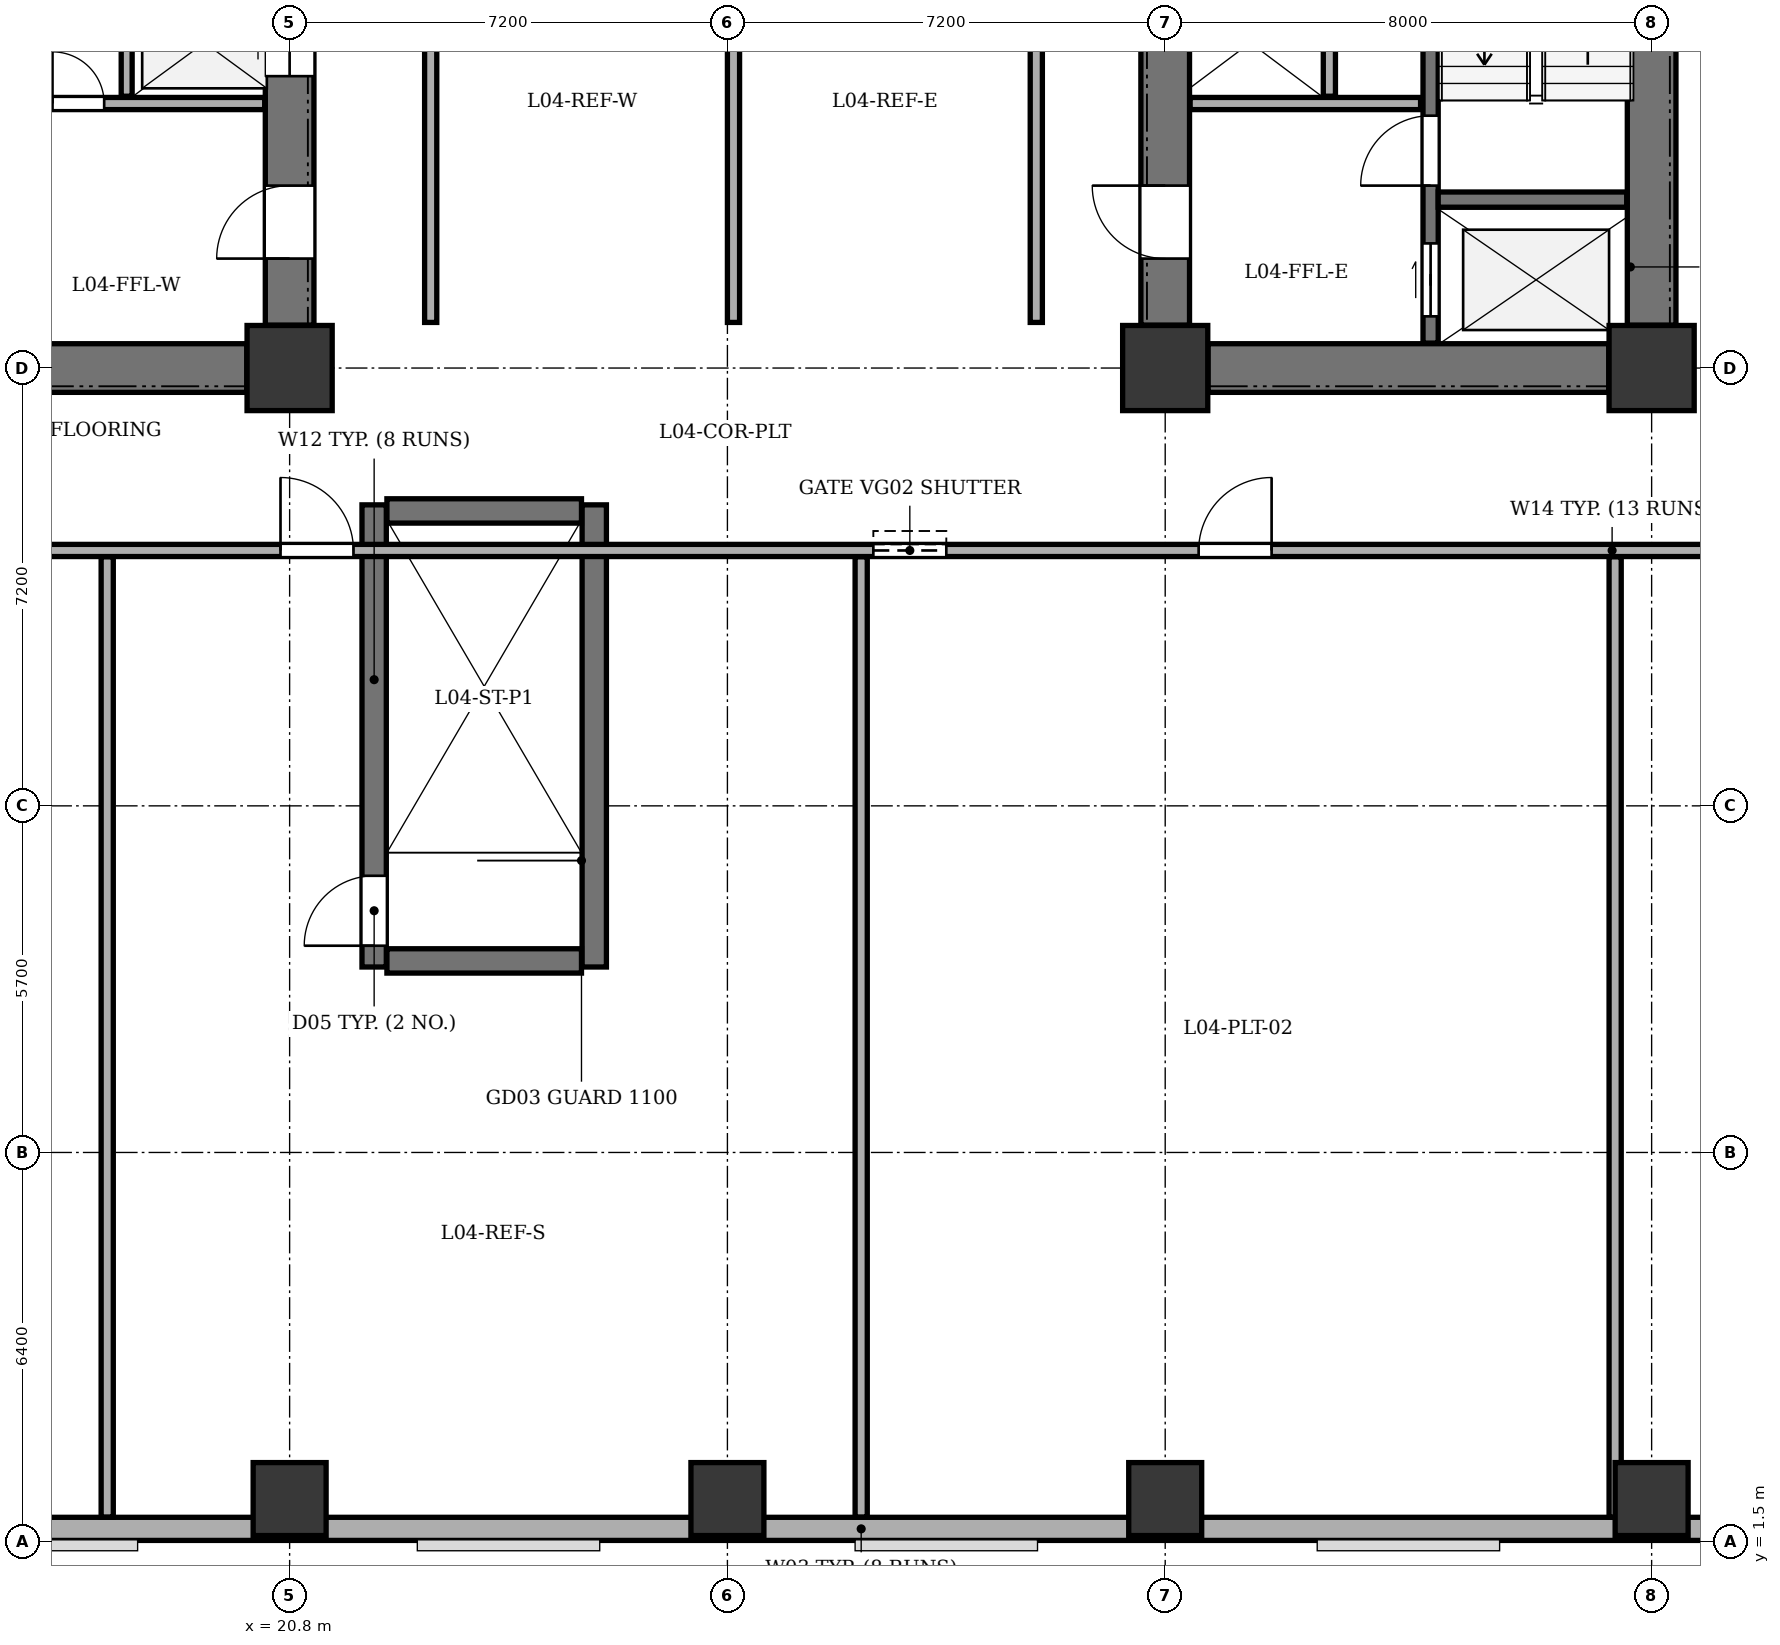
"""IFC4 building model, lengths in metres.
Left out: names, types, materials, properties, quantities, classifications, styles, units other than length and angle.
Written with IfcOpenShell. Run it as: python <this file> out.ifc"""

import sys

from ifc_helpers import new_model, si_unit, direction, frame, frame_2d, origin, origin_2d, place, context, subcontext, project, spatial, rectangle, extrude, element, fill, save


model = new_model("IFC4")
c1 = context("Model", 3, precision=1e-05, world=origin(), true_north=direction((0.0, 1.0)))
c2 = subcontext(c1, "Body", "Model", "MODEL_VIEW")
j1 = project(units=[si_unit("LENGTHUNIT", "METRE"), si_unit("PLANEANGLEUNIT", "RADIAN")], contexts=[c1])
p1 = place(None, origin())
s1 = spatial("IfcSite", under=j1, at=p1, CompositionType="ELEMENT")
p2 = place(p1, origin())
s2 = spatial("IfcBuilding", under=s1, at=p2, CompositionType="ELEMENT")
p3 = place(p2, frame((0.0, 0.0, 18.9)))
s3 = spatial("IfcBuildingStorey", under=s2, at=p3, CompositionType="ELEMENT", Elevation=18.9)
for number, where, z_axis, x_axis in (
    (1, (20.8, 20.8, 0.0), (0.0, 0.0, 1.0), (1.0, 0.0, 0.0)),
    (2, (35.2, 20.8, 0.0), (0.0, 0.0, 1.0), (1.0, 0.0, 0.0)),
    (3, (43.2, 20.8, 0.0), (0.0, 0.0, 1.0), (1.0, 0.0, 0.0)),
):
    element("IfcColumn", number, at=place(p3, frame(where, z_axis=z_axis, x_axis=x_axis)), inside=s3, PredefinedType="COLUMN", context=c2, shape_type="SweptSolid", body=[
        extrude(rectangle(XDim=1.4, YDim=1.4, at=origin_2d()), origin(), (0.0, 0.0, 1.0), 5.4),
    ])
for number, where, z_axis, x_axis in (
    (4, (20.8, 2.2, 0.0), (0.0, 0.0, 1.0), (1.0, 0.0, 0.0)),
    (5, (28.0, 2.2, 0.0), (0.0, 0.0, 1.0), (1.0, 0.0, 0.0)),
    (6, (35.2, 2.2, 0.0), (0.0, 0.0, 1.0), (1.0, 0.0, 0.0)),
    (7, (43.2, 2.2, 0.0), (0.0, 0.0, 1.0), (1.0, 0.0, 0.0)),
):
    element("IfcColumn", number, at=place(p3, frame(where, z_axis=z_axis, x_axis=x_axis)), inside=s3, PredefinedType="COLUMN", context=c2, shape_type="SweptSolid", body=[
        extrude(rectangle(XDim=1.2, YDim=1.2, at=origin_2d()), origin(), (0.0, 0.0, 1.0), 5.4),
    ])
p4 = place(p3, frame((55.0, 1.71, 0.0), z_axis=(0.0, 0.0, 1.0), x_axis=(-1.0, 0.0, 0.0)))
e8 = element("IfcWall", 8, at=p4, inside=s3, PredefinedType="STANDARD", context=c2, shape_type="SweptSolid", body=[
    extrude(rectangle(XDim=49.6, YDim=0.38, at=frame_2d((24.8, 0.0))), origin(), (0.0, 0.0, 1.0), 4.95),
])
p5 = place(p3, frame((13.505, 20.8, 0.0), z_axis=(0.0, 0.0, 1.0), x_axis=(1.0, 0.0, 0.0)))
e9 = element("IfcWall", 9, at=p5, inside=s3, PredefinedType="SHEAR", context=c2, shape_type="SweptSolid", body=[
    extrude(rectangle(XDim=6.59, YDim=0.8, at=frame_2d((3.295, 0.0))), origin(), (0.0, 0.0, 1.0), 4.95),
])
p6 = place(p3, frame((20.8, 21.505, 0.0), z_axis=(0.0, 0.0, 1.0), x_axis=(0.0, 1.0, 0.0)))
e10 = element("IfcWall", 10, at=p6, inside=s3, PredefinedType="SHEAR", context=c2, shape_type="SweptSolid", body=[
    extrude(rectangle(XDim=11.39, YDim=0.8, at=frame_2d((5.695, 0.0))), origin(), (0.0, 0.0, 1.0), 4.95),
])
p7 = place(p6, frame((1.095, 0.0, 0.0)))
e11 = element("IfcOpeningElement", 11, at=p7, cuts=e10, PredefinedType="OPENING", context=c2, shape_type="SweptSolid", body=[
    extrude(rectangle(XDim=1.2, YDim=2.15, at=frame_2d((0.6, 1.075))), frame((0.0, 0.41, 0.0), z_axis=(0.0, -1.0, 0.0), x_axis=(1.0, 0.0, 0.0)), (0.0, 0.0, 1.0), 0.82),
])
p8 = place(p6, frame((4.095, 0.0, 0.0)))
e12 = element("IfcOpeningElement", 12, at=p8, cuts=e10, PredefinedType="OPENING", context=c2, shape_type="SweptSolid", body=[
    extrude(rectangle(XDim=1.1, YDim=2.1, at=frame_2d((0.55, 1.05))), frame((0.0, 0.41, 0.0), z_axis=(0.0, -1.0, 0.0), x_axis=(1.0, 0.0, 0.0)), (0.0, 0.0, 1.0), 0.82),
])
p9 = place(p6, frame((6.045, 0.0, 0.0)))
e13 = element("IfcOpeningElement", 13, at=p9, cuts=e10, PredefinedType="OPENING", context=c2, shape_type="SweptSolid", body=[
    extrude(rectangle(XDim=1.1, YDim=2.1, at=frame_2d((0.55, 1.05))), frame((0.0, 0.41, 0.0), z_axis=(0.0, -1.0, 0.0), x_axis=(1.0, 0.0, 0.0)), (0.0, 0.0, 1.0), 0.82),
])
p10 = place(p6, frame((7.995, 0.0, 0.0)))
e14 = element("IfcOpeningElement", 14, at=p10, cuts=e10, PredefinedType="OPENING", context=c2, shape_type="SweptSolid", body=[
    extrude(rectangle(XDim=1.1, YDim=2.1, at=frame_2d((0.55, 1.05))), frame((0.0, 0.41, 0.0), z_axis=(0.0, -1.0, 0.0), x_axis=(1.0, 0.0, 0.0)), (0.0, 0.0, 1.0), 0.82),
])
p11 = place(p3, frame((16.6, 25.15, 0.0), z_axis=(0.0, 0.0, 1.0), x_axis=(1.0, 0.0, 0.0)))
e15 = element("IfcWall", 15, at=p11, inside=s3, PredefinedType="SOLIDWALL", context=c2, shape_type="SweptSolid", body=[
    extrude(rectangle(XDim=3.79, YDim=0.2, at=frame_2d((1.895, 0.0))), origin(), (0.0, 0.0, 1.0), 4.95),
])
p12 = place(p11, frame((0.3, 0.0, 0.0)))
e16 = element("IfcOpeningElement", 16, at=p12, cuts=e15, PredefinedType="OPENING", context=c2, shape_type="SweptSolid", body=[
    extrude(rectangle(XDim=0.85, YDim=2.02, at=frame_2d((0.425, 1.01))), frame((0.0, 0.11, 0.0), z_axis=(0.0, -1.0, 0.0), x_axis=(1.0, 0.0, 0.0)), (0.0, 0.0, 1.0), 0.22),
])
p13 = place(p3, frame((18.12, 25.27, 0.0), z_axis=(0.0, 0.0, 1.0), x_axis=(0.0, 1.0, 0.0)))
e17 = element("IfcWall", 17, at=p13, inside=s3, PredefinedType="PARTITIONING", context=c2, shape_type="SweptSolid", body=[
    extrude(rectangle(XDim=5.66, YDim=0.18, at=frame_2d((2.83, 0.0))), origin(), (0.0, 0.0, 1.0), 4.95),
])
p14 = place(p3, frame((43.2, 21.505, 0.0), z_axis=(0.0, 0.0, 1.0), x_axis=(0.0, 1.0, 0.0)))
e18 = element("IfcWall", 18, at=p14, inside=s3, PredefinedType="SHEAR", context=c2, shape_type="SweptSolid", body=[
    extrude(rectangle(XDim=11.39, YDim=0.8, at=frame_2d((5.695, 0.0))), origin(), (0.0, 0.0, 1.0), 4.95),
])
p15 = place(p3, frame((35.905, 20.8, 0.0), z_axis=(0.0, 0.0, 1.0), x_axis=(1.0, 0.0, 0.0)))
e19 = element("IfcWall", 19, at=p15, inside=s3, PredefinedType="SHEAR", context=c2, shape_type="SweptSolid", body=[
    extrude(rectangle(XDim=6.59, YDim=0.8, at=frame_2d((3.295, 0.0))), origin(), (0.0, 0.0, 1.0), 4.95),
])
p16 = place(p3, frame((35.2, 21.505, 0.0), z_axis=(0.0, 0.0, 1.0), x_axis=(0.0, 1.0, 0.0)))
e20 = element("IfcWall", 20, at=p16, inside=s3, PredefinedType="SHEAR", context=c2, shape_type="SweptSolid", body=[
    extrude(rectangle(XDim=11.39, YDim=0.8, at=frame_2d((5.695, 0.0))), origin(), (0.0, 0.0, 1.0), 4.95),
])
p17 = place(p16, frame((1.095, 0.0, 0.0)))
e21 = element("IfcOpeningElement", 21, at=p17, cuts=e20, PredefinedType="OPENING", context=c2, shape_type="SweptSolid", body=[
    extrude(rectangle(XDim=1.2, YDim=2.15, at=frame_2d((0.6, 1.075))), frame((0.0, 0.41, 0.0), z_axis=(0.0, -1.0, 0.0), x_axis=(1.0, 0.0, 0.0)), (0.0, 0.0, 1.0), 0.82),
])
p18 = place(p3, frame((39.565, 21.21, 0.0), z_axis=(0.0, 0.0, 1.0), x_axis=(0.0, 1.0, 0.0)))
e22 = element("IfcWall", 22, at=p18, inside=s3, PredefinedType="SHEAR", context=c2, shape_type="SweptSolid", body=[
    extrude(rectangle(XDim=11.98, YDim=0.25, at=frame_2d((5.99, 0.0))), origin(), (0.0, 0.0, 1.0), 4.95),
])
p19 = place(p18, frame((0.44, 0.0, 0.0)))
e23 = element("IfcOpeningElement", 23, at=p19, cuts=e22, PredefinedType="OPENING", context=c2, shape_type="SweptSolid", body=[
    extrude(rectangle(XDim=1.2, YDim=2.15, at=frame_2d((0.6, 1.075))), frame((0.0, 0.135, 0.0), z_axis=(0.0, -1.0, 0.0), x_axis=(1.0, 0.0, 0.0)), (0.0, 0.0, 1.0), 0.27),
])
p20 = place(p18, frame((2.59, 0.0, 0.0)))
e24 = element("IfcOpeningElement", 24, at=p20, cuts=e22, PredefinedType="OPENING", context=c2, shape_type="SweptSolid", body=[
    extrude(rectangle(XDim=1.15, YDim=2.15, at=frame_2d((0.575, 1.075))), frame((0.0, 0.135, 0.0), z_axis=(0.0, -1.0, 0.0), x_axis=(1.0, 0.0, 0.0)), (0.0, 0.0, 1.0), 0.27),
])
p21 = place(p3, frame((39.69, 23.57, 0.0), z_axis=(0.0, 0.0, 1.0), x_axis=(1.0, 0.0, 0.0)))
e25 = element("IfcWall", 25, at=p21, inside=s3, PredefinedType="SHEAR", context=c2, shape_type="SweptSolid", body=[
    extrude(rectangle(XDim=3.1, YDim=0.25, at=frame_2d((1.55, 0.0))), origin(), (0.0, 0.0, 1.0), 4.95),
])
p22 = place(p3, frame((35.61, 25.15, 0.0), z_axis=(0.0, 0.0, 1.0), x_axis=(1.0, 0.0, 0.0)))
e26 = element("IfcWall", 26, at=p22, inside=s3, PredefinedType="SOLIDWALL", context=c2, shape_type="SweptSolid", body=[
    extrude(rectangle(XDim=3.79, YDim=0.2, at=frame_2d((1.895, 0.0))), origin(), (0.0, 0.0, 1.0), 4.95),
])
p23 = place(p3, frame((37.9, 25.27, 0.0), z_axis=(0.0, 0.0, 1.0), x_axis=(0.0, 1.0, 0.0)))
e27 = element("IfcWall", 27, at=p23, inside=s3, PredefinedType="SOLIDWALL", context=c2, shape_type="SweptSolid", body=[
    extrude(rectangle(XDim=7.92, YDim=0.2, at=frame_2d((3.96, 0.0))), origin(), (0.0, 0.0, 1.0), 4.95),
])
p24 = place(p3, frame((22.19, 10.95, 0.0), z_axis=(0.0, 0.0, 1.0), x_axis=(0.0, 1.0, 0.0)))
e28 = element("IfcWall", 28, at=p24, inside=s3, PredefinedType="SHEAR", context=c2, shape_type="SweptSolid", body=[
    extrude(rectangle(XDim=7.6, YDim=0.4, at=frame_2d((3.8, 0.0))), origin(), (0.0, 0.0, 1.0), 4.95),
])
p25 = place(p24, frame((0.35, 0.0, 0.0)))
e29 = element("IfcOpeningElement", 29, at=p25, cuts=e28, PredefinedType="OPENING", context=c2, shape_type="SweptSolid", body=[
    extrude(rectangle(XDim=1.15, YDim=2.15, at=frame_2d((0.575, 1.075))), frame((0.0, 0.21, 0.0), z_axis=(0.0, -1.0, 0.0), x_axis=(1.0, 0.0, 0.0)), (0.0, 0.0, 1.0), 0.42),
])
p26 = place(p3, frame((25.81, 10.95, 0.0), z_axis=(0.0, 0.0, 1.0), x_axis=(0.0, 1.0, 0.0)))
e30 = element("IfcWall", 30, at=p26, inside=s3, PredefinedType="SHEAR", context=c2, shape_type="SweptSolid", body=[
    extrude(rectangle(XDim=7.6, YDim=0.4, at=frame_2d((3.8, 0.0))), origin(), (0.0, 0.0, 1.0), 4.95),
])
for number, where, z_axis, x_axis in (
    (31, (22.4, 11.05, 0.0), (0.0, 0.0, 1.0), (1.0, 0.0, 0.0)),
    (32, (22.4, 18.45, 0.0), (0.0, 0.0, 1.0), (1.0, 0.0, 0.0)),
):
    element("IfcWall", number, at=place(p3, frame(where, z_axis=z_axis, x_axis=x_axis)), inside=s3, PredefinedType="SHEAR", context=c2, shape_type="SweptSolid", body=[
        extrude(rectangle(XDim=3.2, YDim=0.4, at=frame_2d((1.6, 0.0))), origin(), (0.0, 0.0, 1.0), 4.95),
    ])
p27 = place(p3, frame((5.4, 17.8, 0.0), z_axis=(0.0, 0.0, 1.0), x_axis=(1.0, 0.0, 0.0)))
e33 = element("IfcWall", 33, at=p27, inside=s3, PredefinedType="SOLIDWALL", context=c2, shape_type="SweptSolid", body=[
    extrude(rectangle(XDim=49.6, YDim=0.2, at=frame_2d((24.8, 0.0))), origin(), (0.0, 0.0, 1.0), 4.95),
])
p28 = place(p27, frame((5.55, 0.0, 0.0)))
e34 = element("IfcOpeningElement", 34, at=p28, cuts=e33, PredefinedType="OPENING", context=c2, shape_type="SweptSolid", body=[
    extrude(rectangle(XDim=1.2, YDim=2.15, at=frame_2d((0.6, 1.075))), frame((0.0, 0.11, 0.0), z_axis=(0.0, -1.0, 0.0), x_axis=(1.0, 0.0, 0.0)), (0.0, 0.0, 1.0), 0.22),
])
p29 = place(p27, frame((15.25, 0.0, 0.0)))
e35 = element("IfcOpeningElement", 35, at=p29, cuts=e33, PredefinedType="OPENING", context=c2, shape_type="SweptSolid", body=[
    extrude(rectangle(XDim=1.2, YDim=2.15, at=frame_2d((0.6, 1.075))), frame((0.0, 0.11, 0.0), z_axis=(0.0, -1.0, 0.0), x_axis=(1.0, 0.0, 0.0)), (0.0, 0.0, 1.0), 0.22),
])
p30 = place(p27, frame((30.35, 0.0, 0.0)))
e36 = element("IfcOpeningElement", 36, at=p30, cuts=e33, PredefinedType="OPENING", context=c2, shape_type="SweptSolid", body=[
    extrude(rectangle(XDim=1.2, YDim=2.15, at=frame_2d((0.6, 1.075))), frame((0.0, 0.11, 0.0), z_axis=(0.0, -1.0, 0.0), x_axis=(1.0, 0.0, 0.0)), (0.0, 0.0, 1.0), 0.22),
])
p31 = place(p27, frame((42.75, 0.0, 0.0)))
e37 = element("IfcOpeningElement", 37, at=p31, cuts=e33, PredefinedType="OPENING", context=c2, shape_type="SweptSolid", body=[
    extrude(rectangle(XDim=1.2, YDim=2.15, at=frame_2d((0.6, 1.075))), frame((0.0, 0.11, 0.0), z_axis=(0.0, -1.0, 0.0), x_axis=(1.0, 0.0, 0.0)), (0.0, 0.0, 1.0), 0.22),
])
p32 = place(p27, frame((25.0, 0.0, 0.0)))
e38 = element("IfcOpeningElement", 38, at=p32, cuts=e33, PredefinedType="OPENING", context=c2, shape_type="SweptSolid", body=[
    extrude(rectangle(XDim=1.2, YDim=2.15, at=frame_2d((0.6, 1.075))), frame((0.0, 0.11, 0.0), z_axis=(0.0, -1.0, 0.0), x_axis=(1.0, 0.0, 0.0)), (0.0, 0.0, 1.0), 0.22),
])
for number, where, z_axis, x_axis in (
    (39, (23.12, 21.55, 0.0), (0.0, 0.0, 1.0), (0.0, 1.0, 0.0)),
    (40, (33.08, 21.55, 0.0), (0.0, 0.0, 1.0), (0.0, 1.0, 0.0)),
):
    element("IfcWall", number, at=place(p3, frame(where, z_axis=z_axis, x_axis=x_axis)), inside=s3, PredefinedType="SOLIDWALL", context=c2, shape_type="SweptSolid", body=[
        extrude(rectangle(XDim=8.45, YDim=0.2, at=frame_2d((4.225, 0.0))), origin(), (0.0, 0.0, 1.0), 4.95),
    ])
p33 = place(p3, frame((28.1, 21.55, 0.0), z_axis=(0.0, 0.0, 1.0), x_axis=(0.0, 1.0, 0.0)))
e41 = element("IfcWall", 41, at=p33, inside=s3, PredefinedType="SOLIDWALL", context=c2, shape_type="SweptSolid", body=[
    extrude(rectangle(XDim=8.45, YDim=0.2, at=frame_2d((4.225, 0.0))), origin(), (0.0, 0.0, 1.0), 4.035),
])
p34 = place(p3, frame((17.8, 1.905, 0.0), z_axis=(0.0, 0.0, 1.0), x_axis=(0.0, 1.0, 0.0)))
e42 = element("IfcWall", 42, at=p34, inside=s3, PredefinedType="SOLIDWALL", context=c2, shape_type="SweptSolid", body=[
    extrude(rectangle(XDim=15.79, YDim=0.2, at=frame_2d((7.895, 0.0))), origin(), (0.0, 0.0, 1.0), 4.385),
])
for number, where, z_axis, x_axis in (
    (43, (30.2, 1.905, 0.0), (0.0, 0.0, 1.0), (0.0, 1.0, 0.0)),
    (44, (42.6, 1.905, 0.0), (0.0, 0.0, 1.0), (0.0, 1.0, 0.0)),
):
    element("IfcWall", number, at=place(p3, frame(where, z_axis=z_axis, x_axis=x_axis)), inside=s3, PredefinedType="SOLIDWALL", context=c2, shape_type="SweptSolid", body=[
        extrude(rectangle(XDim=15.79, YDim=0.2, at=frame_2d((7.895, 0.0))), origin(), (0.0, 0.0, 1.0), 4.95),
    ])
p35 = place(p7, origin())
e45 = element("IfcDoor", 45, at=p35, inside=s3, OperationType="SINGLE_SWING_LEFT", PredefinedType="DOOR", context=c2, shape_type="SweptSolid", body=[
    extrude(rectangle(XDim=1.2, YDim=2.15, at=frame_2d((0.6, 1.075))), frame((0.0, 0.025, 0.0), z_axis=(0.0, -1.0, 0.0), x_axis=(1.0, 0.0, 0.0)), (0.0, 0.0, 1.0), 0.05),
])
fill(e11, e45)
p36 = place(p8, origin())
e46 = element("IfcDoor", 46, at=p36, inside=s3, OperationType="DOUBLE_DOOR_SLIDING", PredefinedType="DOOR", context=c2, shape_type="SweptSolid", body=[
    extrude(rectangle(XDim=1.1, YDim=2.1, at=frame_2d((0.55, 1.05))), frame((0.0, 0.025, 0.0), z_axis=(0.0, -1.0, 0.0), x_axis=(1.0, 0.0, 0.0)), (0.0, 0.0, 1.0), 0.05),
])
fill(e12, e46)
p37 = place(p12, origin())
e47 = element("IfcDoor", 47, at=p37, inside=s3, OperationType="SINGLE_SWING_LEFT", PredefinedType="DOOR", context=c2, shape_type="SweptSolid", body=[
    extrude(rectangle(XDim=0.85, YDim=2.02, at=frame_2d((0.425, 1.01))), frame((0.0, 0.025, 0.0), z_axis=(0.0, -1.0, 0.0), x_axis=(1.0, 0.0, 0.0)), (0.0, 0.0, 1.0), 0.05),
])
fill(e16, e47)
p38 = place(p17, origin())
e48 = element("IfcDoor", 48, at=p38, inside=s3, OperationType="SINGLE_SWING_RIGHT", PredefinedType="DOOR", context=c2, shape_type="SweptSolid", body=[
    extrude(rectangle(XDim=1.2, YDim=2.15, at=frame_2d((0.6, 1.075))), frame((0.0, 0.025, 0.0), z_axis=(0.0, -1.0, 0.0), x_axis=(1.0, 0.0, 0.0)), (0.0, 0.0, 1.0), 0.05),
])
fill(e21, e48)
p39 = place(p19, origin())
e49 = element("IfcDoor", 49, at=p39, inside=s3, OperationType="DOUBLE_DOOR_SLIDING", PredefinedType="DOOR", context=c2, shape_type="SweptSolid", body=[
    extrude(rectangle(XDim=1.2, YDim=2.15, at=frame_2d((0.6, 1.075))), frame((0.0, 0.025, 0.0), z_axis=(0.0, -1.0, 0.0), x_axis=(1.0, 0.0, 0.0)), (0.0, 0.0, 1.0), 0.05),
])
fill(e23, e49)
p40 = place(p20, origin())
e50 = element("IfcDoor", 50, at=p40, inside=s3, OperationType="SINGLE_SWING_LEFT", PredefinedType="DOOR", context=c2, shape_type="SweptSolid", body=[
    extrude(rectangle(XDim=1.15, YDim=2.15, at=frame_2d((0.575, 1.075))), frame((0.0, 0.025, 0.0), z_axis=(0.0, -1.0, 0.0), x_axis=(1.0, 0.0, 0.0)), (0.0, 0.0, 1.0), 0.05),
])
fill(e24, e50)
p41 = place(p25, origin())
e51 = element("IfcDoor", 51, at=p41, inside=s3, OperationType="SINGLE_SWING_LEFT", PredefinedType="DOOR", context=c2, shape_type="SweptSolid", body=[
    extrude(rectangle(XDim=1.15, YDim=2.15, at=frame_2d((0.575, 1.075))), frame((0.0, 0.025, 0.0), z_axis=(0.0, -1.0, 0.0), x_axis=(1.0, 0.0, 0.0)), (0.0, 0.0, 1.0), 0.05),
])
fill(e29, e51)
p42 = place(p29, origin())
e52 = element("IfcDoor", 52, at=p42, inside=s3, OperationType="SINGLE_SWING_LEFT", PredefinedType="DOOR", context=c2, shape_type="SweptSolid", body=[
    extrude(rectangle(XDim=1.2, YDim=2.15, at=frame_2d((0.6, 1.075))), frame((0.0, 0.025, 0.0), z_axis=(0.0, -1.0, 0.0), x_axis=(1.0, 0.0, 0.0)), (0.0, 0.0, 1.0), 0.05),
])
fill(e35, e52)
p43 = place(p30, origin())
e53 = element("IfcDoor", 53, at=p43, inside=s3, OperationType="SINGLE_SWING_RIGHT", PredefinedType="DOOR", context=c2, shape_type="SweptSolid", body=[
    extrude(rectangle(XDim=1.2, YDim=2.15, at=frame_2d((0.6, 1.075))), frame((0.0, 0.025, 0.0), z_axis=(0.0, -1.0, 0.0), x_axis=(1.0, 0.0, 0.0)), (0.0, 0.0, 1.0), 0.05),
])
fill(e36, e53)
p44 = place(p32, origin())
e54 = element("IfcDoor", 54, at=p44, inside=s3, OperationType="SINGLE_SWING_LEFT", PredefinedType="GATE", context=c2, shape_type="SweptSolid", body=[
    extrude(rectangle(XDim=1.2, YDim=2.15, at=frame_2d((0.6, 1.075))), frame((0.0, 0.025, 0.0), z_axis=(0.0, -1.0, 0.0), x_axis=(1.0, 0.0, 0.0)), (0.0, 0.0, 1.0), 0.05),
])
fill(e38, e54)
save(model, sys.argv[1])
